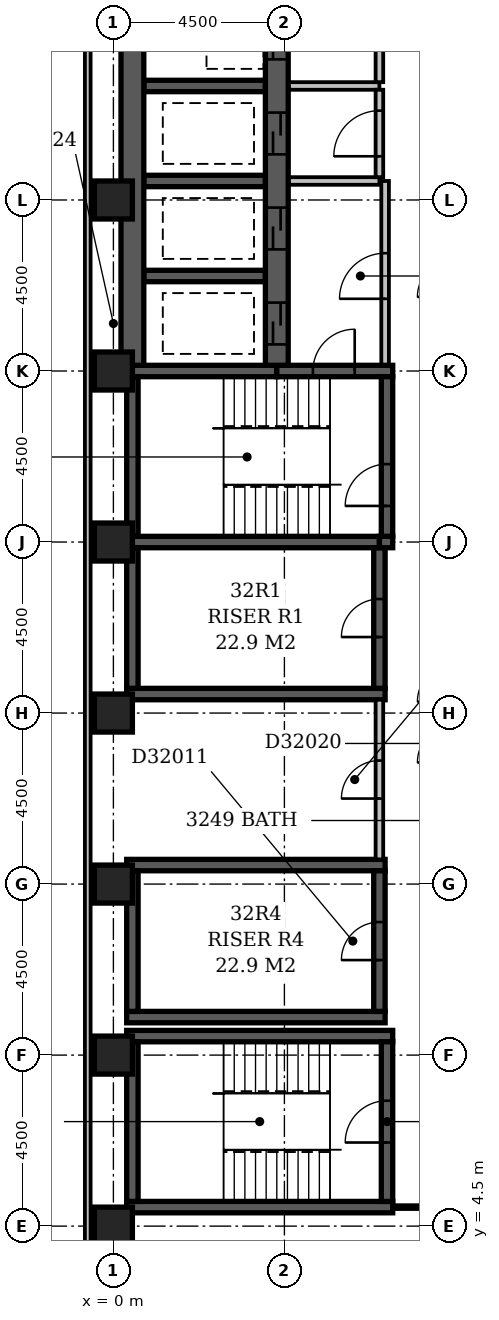
"""IFC4 building model, lengths in metres.
Left out: names, types, materials, properties, quantities, classifications, styles, units other than length and angle.
Written with IfcOpenShell. Run it as: python <this file> out.ifc"""

import sys

from ifc_helpers import new_model, si_unit, direction, frame, frame_2d, origin, origin_2d, place, context, subcontext, project, spatial, rectangle, extrude, element, fill, save


model = new_model("IFC4")
c1 = context("Model", 3, precision=1e-05, world=origin(), true_north=direction((0.0, 1.0)))
c2 = subcontext(c1, "Body", "Model", "MODEL_VIEW")
j1 = project(units=[si_unit("LENGTHUNIT", "METRE"), si_unit("PLANEANGLEUNIT", "RADIAN")], contexts=[c1])
p1 = place(None, origin())
s1 = spatial("IfcSite", under=j1, at=p1, CompositionType="ELEMENT")
p2 = place(p1, origin())
s2 = spatial("IfcBuilding", under=s1, at=p2, CompositionType="ELEMENT")
p3 = place(p2, frame((0.0, 0.0, 130.4)))
s3 = spatial("IfcBuildingStorey", under=s2, at=p3, CompositionType="ELEMENT", Elevation=130.4)
for number, where, z_axis, x_axis in (
    (1, (0.35, 5.0, -0.3), (0.0, 0.0, 1.0), (1.0, 0.0, 0.0)),
    (2, (0.35, 9.5, -0.3), (0.0, 0.0, 1.0), (1.0, 0.0, 0.0)),
):
    element("IfcWall", number, at=place(p3, frame(where, z_axis=z_axis, x_axis=x_axis)), inside=s3, PredefinedType="SHEAR", context=c2, shape_type="SweptSolid", body=[
        extrude(rectangle(XDim=7.0, YDim=0.3, at=frame_2d((3.5, 0.0))), origin(), (0.0, 0.0, 1.0), 3.6),
    ])
for number, where, z_axis, x_axis in (
    (3, (0.35, 10.0, -0.3), (0.0, 0.0, 1.0), (1.0, 0.0, 0.0)),
    (4, (0.35, 14.0, -0.3), (0.0, 0.0, 1.0), (1.0, 0.0, 0.0)),
    (5, (0.35, 18.5, -0.3), (0.0, 0.0, 1.0), (1.0, 0.0, 0.0)),
):
    element("IfcWall", number, at=place(p3, frame(where, z_axis=z_axis, x_axis=x_axis)), inside=s3, PredefinedType="SHEAR", context=c2, shape_type="SweptSolid", body=[
        extrude(rectangle(XDim=6.8, YDim=0.3, at=frame_2d((3.4, 0.0))), origin(), (0.0, 0.0, 1.0), 3.6),
    ])
p4 = place(p3, frame((0.35, 22.5, -0.3), z_axis=(0.0, 0.0, 1.0), x_axis=(1.0, 0.0, 0.0)))
e6 = element("IfcWall", 6, at=p4, inside=s3, PredefinedType="SHEAR", context=c2, shape_type="SweptSolid", body=[
    extrude(rectangle(XDim=6.65, YDim=0.3, at=frame_2d((3.325, 0.0))), origin(), (0.0, 0.0, 1.0), 3.6),
])
p5 = place(p3, frame((0.35, 27.0, -0.3), z_axis=(0.0, 0.0, 1.0), x_axis=(1.0, 0.0, 0.0)))
e7 = element("IfcWall", 7, at=p5, inside=s3, PredefinedType="SHEAR", context=c2, shape_type="SweptSolid", body=[
    extrude(rectangle(XDim=3.95, YDim=0.3, at=frame_2d((1.975, 0.0))), origin(), (0.0, 0.0, 1.0), 3.6),
])
p6 = place(p3, frame((0.5, 5.15, -0.3), z_axis=(0.0, 0.0, 1.0), x_axis=(0.0, 1.0, 0.0)))
e8 = element("IfcWall", 8, at=p6, inside=s3, PredefinedType="SHEAR", context=c2, shape_type="SweptSolid", body=[
    extrude(rectangle(XDim=4.2, YDim=0.3, at=frame_2d((2.1, 0.0))), origin(), (0.0, 0.0, 1.0), 3.6),
])
for number, where, z_axis, x_axis in (
    (9, (0.5, 10.15, -0.3), (0.0, 0.0, 1.0), (0.0, 1.0, 0.0)),
    (10, (0.5, 18.65, -0.3), (0.0, 0.0, 1.0), (0.0, 1.0, 0.0)),
):
    element("IfcWall", number, at=place(p3, frame(where, z_axis=z_axis, x_axis=x_axis)), inside=s3, PredefinedType="SHEAR", context=c2, shape_type="SweptSolid", body=[
        extrude(rectangle(XDim=3.7, YDim=0.3, at=frame_2d((1.85, 0.0))), origin(), (0.0, 0.0, 1.0), 3.6),
    ])
p7 = place(p3, frame((0.5, 22.65, -0.3), z_axis=(0.0, 0.0, 1.0), x_axis=(0.0, 1.0, 0.0)))
e11 = element("IfcWall", 11, at=p7, inside=s3, PredefinedType="SHEAR", context=c2, shape_type="SweptSolid", body=[
    extrude(rectangle(XDim=4.2, YDim=0.3, at=frame_2d((2.1, 0.0))), origin(), (0.0, 0.0, 1.0), 3.6),
])
p8 = place(p3, frame((0.5, 27.15, -0.3), z_axis=(0.0, 0.0, 1.0), x_axis=(0.0, 1.0, 0.0)))
e12 = element("IfcWall", 12, at=p8, inside=s3, PredefinedType="SHEAR", context=c2, shape_type="SweptSolid", body=[
    extrude(rectangle(XDim=22.05, YDim=0.6, at=frame_2d((11.025, 0.0))), origin(), (0.0, 0.0, 1.0), 3.6),
])
for number, where, z_axis, x_axis in (
    (13, (0.8, 29.5, -0.3), (0.0, 0.0, 1.0), (1.0, 0.0, 0.0)),
    (14, (0.8, 32.0, -0.3), (0.0, 0.0, 1.0), (1.0, 0.0, 0.0)),
    (15, (0.8, 34.5, -0.3), (0.0, 0.0, 1.0), (1.0, 0.0, 0.0)),
):
    element("IfcWall", number, at=place(p3, frame(where, z_axis=z_axis, x_axis=x_axis)), inside=s3, PredefinedType="SHEAR", context=c2, shape_type="SweptSolid", body=[
        extrude(rectangle(XDim=3.2, YDim=0.3, at=frame_2d((1.6, 0.0))), origin(), (0.0, 0.0, 1.0), 3.6),
    ])
p9 = place(p3, frame((4.3, 27.0, -0.3), z_axis=(0.0, 0.0, 1.0), x_axis=(1.0, 0.0, 0.0)))
e16 = element("IfcWall", 16, at=p9, inside=s3, PredefinedType="SHEAR", context=c2, shape_type="SweptSolid", body=[
    extrude(rectangle(XDim=3.05, YDim=0.3, at=frame_2d((1.525, 0.0))), origin(), (0.0, 0.0, 1.0), 3.6),
])
p10 = place(p9, frame((0.95, 0.0, 0.3)))
e17 = element("IfcOpeningElement", 17, at=p10, cuts=e16, PredefinedType="OPENING", context=c2, shape_type="SweptSolid", body=[
    extrude(rectangle(XDim=1.1, YDim=2.1, at=frame_2d((0.55, 1.05))), frame((0.0, 0.162, 0.0), z_axis=(0.0, -1.0, 0.0), x_axis=(1.0, 0.0, 0.0)), (0.0, 0.0, 1.0), 0.324),
])
p11 = place(p3, frame((4.3, 27.15, -0.3), z_axis=(0.0, 0.0, 1.0), x_axis=(0.0, 1.0, 0.0)))
e18 = element("IfcWall", 18, at=p11, inside=s3, PredefinedType="SHEAR", context=c2, shape_type="SweptSolid", body=[
    extrude(rectangle(XDim=22.05, YDim=0.6, at=frame_2d((11.025, 0.0))), origin(), (0.0, 0.0, 1.0), 3.6),
])
p12 = place(p11, frame((3.05, 0.0, 0.3)))
e19 = element("IfcOpeningElement", 19, at=p12, cuts=e18, PredefinedType="OPENING", context=c2, shape_type="SweptSolid", body=[
    extrude(rectangle(XDim=1.1, YDim=2.1, at=frame_2d((0.55, 1.05))), frame((0.0, 0.312, 0.0), z_axis=(0.0, -1.0, 0.0), x_axis=(1.0, 0.0, 0.0)), (0.0, 0.0, 1.0), 0.624),
])
p13 = place(p11, frame((0.55, 0.0, 0.3)))
e20 = element("IfcOpeningElement", 20, at=p13, cuts=e18, PredefinedType="OPENING", context=c2, shape_type="SweptSolid", body=[
    extrude(rectangle(XDim=1.1, YDim=2.1, at=frame_2d((0.55, 1.05))), frame((0.0, 0.312, 0.0), z_axis=(0.0, -1.0, 0.0), x_axis=(1.0, 0.0, 0.0)), (0.0, 0.0, 1.0), 0.624),
])
p14 = place(p11, frame((20.55, 0.0, 0.3)))
e21 = element("IfcOpeningElement", 21, at=p14, cuts=e18, PredefinedType="OPENING", context=c2, shape_type="SweptSolid", body=[
    extrude(rectangle(XDim=1.1, YDim=2.1, at=frame_2d((0.55, 1.05))), frame((0.0, 0.312, 0.0), z_axis=(0.0, -1.0, 0.0), x_axis=(1.0, 0.0, 0.0)), (0.0, 0.0, 1.0), 0.624),
])
p15 = place(p11, frame((18.05, 0.0, 0.3)))
e22 = element("IfcOpeningElement", 22, at=p15, cuts=e18, PredefinedType="OPENING", context=c2, shape_type="SweptSolid", body=[
    extrude(rectangle(XDim=1.1, YDim=2.1, at=frame_2d((0.55, 1.05))), frame((0.0, 0.312, 0.0), z_axis=(0.0, -1.0, 0.0), x_axis=(1.0, 0.0, 0.0)), (0.0, 0.0, 1.0), 0.624),
])
p16 = place(p11, frame((15.55, 0.0, 0.3)))
e23 = element("IfcOpeningElement", 23, at=p16, cuts=e18, PredefinedType="OPENING", context=c2, shape_type="SweptSolid", body=[
    extrude(rectangle(XDim=1.1, YDim=2.1, at=frame_2d((0.55, 1.05))), frame((0.0, 0.312, 0.0), z_axis=(0.0, -1.0, 0.0), x_axis=(1.0, 0.0, 0.0)), (0.0, 0.0, 1.0), 0.624),
])
p17 = place(p11, frame((13.05, 0.0, 0.3)))
e24 = element("IfcOpeningElement", 24, at=p17, cuts=e18, PredefinedType="OPENING", context=c2, shape_type="SweptSolid", body=[
    extrude(rectangle(XDim=1.1, YDim=2.1, at=frame_2d((0.55, 1.05))), frame((0.0, 0.312, 0.0), z_axis=(0.0, -1.0, 0.0), x_axis=(1.0, 0.0, 0.0)), (0.0, 0.0, 1.0), 0.624),
])
p18 = place(p11, frame((10.55, 0.0, 0.3)))
e25 = element("IfcOpeningElement", 25, at=p18, cuts=e18, PredefinedType="OPENING", context=c2, shape_type="SweptSolid", body=[
    extrude(rectangle(XDim=1.1, YDim=2.1, at=frame_2d((0.55, 1.05))), frame((0.0, 0.312, 0.0), z_axis=(0.0, -1.0, 0.0), x_axis=(1.0, 0.0, 0.0)), (0.0, 0.0, 1.0), 0.624),
])
p19 = place(p11, frame((8.05, 0.0, 0.3)))
e26 = element("IfcOpeningElement", 26, at=p19, cuts=e18, PredefinedType="OPENING", context=c2, shape_type="SweptSolid", body=[
    extrude(rectangle(XDim=1.1, YDim=2.1, at=frame_2d((0.55, 1.05))), frame((0.0, 0.312, 0.0), z_axis=(0.0, -1.0, 0.0), x_axis=(1.0, 0.0, 0.0)), (0.0, 0.0, 1.0), 0.624),
])
p20 = place(p11, frame((5.55, 0.0, 0.3)))
e27 = element("IfcOpeningElement", 27, at=p20, cuts=e18, PredefinedType="OPENING", context=c2, shape_type="SweptSolid", body=[
    extrude(rectangle(XDim=1.1, YDim=2.1, at=frame_2d((0.55, 1.05))), frame((0.0, 0.312, 0.0), z_axis=(0.0, -1.0, 0.0), x_axis=(1.0, 0.0, 0.0)), (0.0, 0.0, 1.0), 0.624),
])
p21 = place(p3, frame((7.0, 10.15, -0.3), z_axis=(0.0, 0.0, 1.0), x_axis=(0.0, 1.0, 0.0)))
e28 = element("IfcWall", 28, at=p21, inside=s3, PredefinedType="SHEAR", context=c2, shape_type="SweptSolid", body=[
    extrude(rectangle(XDim=3.7, YDim=0.3, at=frame_2d((1.85, 0.0))), origin(), (0.0, 0.0, 1.0), 3.6),
])
p22 = place(p21, frame((1.35, 0.0, 0.3)))
e29 = element("IfcOpeningElement", 29, at=p22, cuts=e28, PredefinedType="OPENING", context=c2, shape_type="SweptSolid", body=[
    extrude(rectangle(XDim=1.0, YDim=2.1, at=frame_2d((0.5, 1.05))), frame((0.0, 0.162, 0.0), z_axis=(0.0, -1.0, 0.0), x_axis=(1.0, 0.0, 0.0)), (0.0, 0.0, 1.0), 0.324),
])
p23 = place(p3, frame((7.0, 18.65, -0.3), z_axis=(0.0, 0.0, 1.0), x_axis=(0.0, 1.0, 0.0)))
e30 = element("IfcWall", 30, at=p23, inside=s3, PredefinedType="SHEAR", context=c2, shape_type="SweptSolid", body=[
    extrude(rectangle(XDim=3.7, YDim=0.3, at=frame_2d((1.85, 0.0))), origin(), (0.0, 0.0, 1.0), 3.6),
])
p24 = place(p23, frame((1.35, 0.0, 0.3)))
e31 = element("IfcOpeningElement", 31, at=p24, cuts=e30, PredefinedType="OPENING", context=c2, shape_type="SweptSolid", body=[
    extrude(rectangle(XDim=1.0, YDim=2.1, at=frame_2d((0.5, 1.05))), frame((0.0, 0.162, 0.0), z_axis=(0.0, -1.0, 0.0), x_axis=(1.0, 0.0, 0.0)), (0.0, 0.0, 1.0), 0.324),
])
p25 = place(p3, frame((7.0, 22.5, -0.3), z_axis=(0.0, 0.0, 1.0), x_axis=(1.0, 0.0, 0.0)))
e32 = element("IfcWall", 32, at=p25, inside=s3, PredefinedType="SHEAR", context=c2, shape_type="SweptSolid", body=[
    extrude(rectangle(XDim=0.35, YDim=0.3, at=frame_2d((0.175, 0.0))), origin(), (0.0, 0.0, 1.0), 3.6),
])
p26 = place(p3, frame((7.2, 5.15, -0.3), z_axis=(0.0, 0.0, 1.0), x_axis=(0.0, 1.0, 0.0)))
e33 = element("IfcWall", 33, at=p26, inside=s3, PredefinedType="SHEAR", context=c2, shape_type="SweptSolid", body=[
    extrude(rectangle(XDim=4.2, YDim=0.3, at=frame_2d((2.1, 0.0))), origin(), (0.0, 0.0, 1.0), 3.6),
])
p27 = place(p26, frame((1.55, 0.0, 0.3)))
e34 = element("IfcOpeningElement", 34, at=p27, cuts=e33, PredefinedType="OPENING", context=c2, shape_type="SweptSolid", body=[
    extrude(rectangle(XDim=1.1, YDim=2.1, at=frame_2d((0.55, 1.05))), frame((0.0, 0.162, 0.0), z_axis=(0.0, -1.0, 0.0), x_axis=(1.0, 0.0, 0.0)), (0.0, 0.0, 1.0), 0.324),
])
p28 = place(p3, frame((7.2, 22.65, -0.3), z_axis=(0.0, 0.0, 1.0), x_axis=(0.0, 1.0, 0.0)))
e35 = element("IfcWall", 35, at=p28, inside=s3, PredefinedType="SHEAR", context=c2, shape_type="SweptSolid", body=[
    extrude(rectangle(XDim=4.2, YDim=0.3, at=frame_2d((2.1, 0.0))), origin(), (0.0, 0.0, 1.0), 3.6),
])
p29 = place(p28, frame((0.8, 0.0, 0.3)))
e36 = element("IfcOpeningElement", 36, at=p29, cuts=e35, PredefinedType="OPENING", context=c2, shape_type="SweptSolid", body=[
    extrude(rectangle(XDim=1.1, YDim=2.1, at=frame_2d((0.55, 1.05))), frame((0.0, 0.162, 0.0), z_axis=(0.0, -1.0, 0.0), x_axis=(1.0, 0.0, 0.0)), (0.0, 0.0, 1.0), 0.324),
])
for number, where, z_axis, x_axis in (
    (37, (0.0, 4.5, -0.3), (0.0, 0.0, 1.0), (1.0, 0.0, 0.0)),
    (38, (0.0, 9.0, -0.3), (0.0, 0.0, 1.0), (1.0, 0.0, 0.0)),
    (39, (0.0, 13.5, -0.3), (0.0, 0.0, 1.0), (1.0, 0.0, 0.0)),
    (40, (0.0, 18.0, -0.3), (0.0, 0.0, 1.0), (1.0, 0.0, 0.0)),
    (41, (0.0, 22.5, -0.3), (0.0, 0.0, 1.0), (1.0, 0.0, 0.0)),
    (42, (0.0, 27.0, -0.3), (0.0, 0.0, 1.0), (1.0, 0.0, 0.0)),
    (43, (0.0, 31.5, -0.3), (0.0, 0.0, 1.0), (1.0, 0.0, 0.0)),
):
    element("IfcColumn", number, at=place(p3, frame(where, z_axis=z_axis, x_axis=x_axis)), inside=s3, PredefinedType="COLUMN", context=c2, shape_type="SweptSolid", body=[
        extrude(rectangle(XDim=1.0, YDim=1.0, at=origin_2d()), origin(), (0.0, 0.0, 1.0), 3.6),
    ])
p30 = place(p3, frame((-0.675, 59.1, 0.0), z_axis=(0.0, 0.0, 1.0), x_axis=(0.0, -1.0, 0.0)))
e44 = element("IfcWall", 44, at=p30, inside=s3, PredefinedType="STANDARD", context=c2, shape_type="SweptSolid", body=[
    extrude(rectangle(XDim=55.35, YDim=0.15, at=frame_2d((27.675, 0.0))), origin(), (0.0, 0.0, 1.0), 2.7),
])
p31 = place(p3, frame((4.62, 34.5, 0.0), z_axis=(0.0, 0.0, 1.0), x_axis=(1.0, 0.0, 0.0)))
e45 = element("IfcWall", 45, at=p31, inside=s3, PredefinedType="PARTITIONING", context=c2, shape_type="SweptSolid", body=[
    extrude(rectangle(XDim=2.38, YDim=0.2, at=frame_2d((1.19, 0.0))), origin(), (0.0, 0.0, 1.0), 3.3),
])
p32 = place(p3, frame((7.0, 34.6, 0.0), z_axis=(0.0, 0.0, 1.0), x_axis=(0.0, 1.0, 0.0)))
e46 = element("IfcWall", 46, at=p32, inside=s3, PredefinedType="PARTITIONING", context=c2, shape_type="SweptSolid", body=[
    extrude(rectangle(XDim=14.9, YDim=0.2, at=frame_2d((7.45, 0.0))), origin(), (0.0, 0.0, 1.0), 3.3),
])
p33 = place(p32, frame((2.8, 0.0, 0.0)))
e47 = element("IfcOpeningElement", 47, at=p33, cuts=e46, PredefinedType="OPENING", context=c2, shape_type="SweptSolid", body=[
    extrude(rectangle(XDim=1.2, YDim=2.1, at=frame_2d((0.6, 1.05))), frame((0.0, 0.112, 0.0), z_axis=(0.0, -1.0, 0.0), x_axis=(1.0, 0.0, 0.0)), (0.0, 0.0, 1.0), 0.224),
])
p34 = place(p32, frame((9.8, 0.0, 0.0)))
e48 = element("IfcOpeningElement", 48, at=p34, cuts=e46, PredefinedType="OPENING", context=c2, shape_type="SweptSolid", body=[
    extrude(rectangle(XDim=1.2, YDim=2.1, at=frame_2d((0.6, 1.05))), frame((0.0, 0.112, 0.0), z_axis=(0.0, -1.0, 0.0), x_axis=(1.0, 0.0, 0.0)), (0.0, 0.0, 1.0), 0.224),
])
p35 = place(p3, frame((4.62, 32.0, 0.0), z_axis=(0.0, 0.0, 1.0), x_axis=(1.0, 0.0, 0.0)))
e49 = element("IfcWall", 49, at=p35, inside=s3, PredefinedType="PARTITIONING", context=c2, shape_type="SweptSolid", body=[
    extrude(rectangle(XDim=2.38, YDim=0.2, at=frame_2d((1.19, 0.0))), origin(), (0.0, 0.0, 1.0), 3.3),
])
p36 = place(p3, frame((7.0, 32.1, 0.0), z_axis=(0.0, 0.0, 1.0), x_axis=(0.0, 1.0, 0.0)))
e50 = element("IfcWall", 50, at=p36, inside=s3, PredefinedType="PARTITIONING", context=c2, shape_type="SweptSolid", body=[
    extrude(rectangle(XDim=2.3, YDim=0.2, at=frame_2d((1.15, 0.0))), origin(), (0.0, 0.0, 1.0), 3.3),
])
p37 = place(p36, frame((0.55, 0.0, 0.0)))
e51 = element("IfcOpeningElement", 51, at=p37, cuts=e50, PredefinedType="OPENING", context=c2, shape_type="SweptSolid", body=[
    extrude(rectangle(XDim=1.2, YDim=2.1, at=frame_2d((0.6, 1.05))), frame((0.0, 0.112, 0.0), z_axis=(0.0, -1.0, 0.0), x_axis=(1.0, 0.0, 0.0)), (0.0, 0.0, 1.0), 0.224),
])
p38 = place(p3, frame((7.15, 27.17, 0.0), z_axis=(0.0, 0.0, 1.0), x_axis=(0.0, 1.0, 0.0)))
e52 = element("IfcWall", 52, at=p38, inside=s3, PredefinedType="PARTITIONING", context=c2, shape_type="SweptSolid", body=[
    extrude(rectangle(XDim=4.83, YDim=0.2, at=frame_2d((2.415, 0.0))), origin(), (0.0, 0.0, 1.0), 3.3),
])
p39 = place(p38, frame((1.73, 0.0, 0.0)))
e53 = element("IfcOpeningElement", 53, at=p39, cuts=e52, PredefinedType="OPENING", context=c2, shape_type="SweptSolid", body=[
    extrude(rectangle(XDim=1.2, YDim=2.1, at=frame_2d((0.6, 1.05))), frame((0.0, 0.112, 0.0), z_axis=(0.0, -1.0, 0.0), x_axis=(1.0, 0.0, 0.0)), (0.0, 0.0, 1.0), 0.224),
])
p40 = place(p3, frame((0.0, 4.5, 0.0), z_axis=(0.0, 0.0, 1.0), x_axis=(0.0, 1.0, 0.0)))
e54 = element("IfcWall", 54, at=p40, inside=s3, PredefinedType="PARTITIONING", context=c2, shape_type="SweptSolid", body=[
    extrude(rectangle(XDim=0.5, YDim=0.1, at=frame_2d((0.25, 0.0))), origin(), (0.0, 0.0, 1.0), 2.7),
])
p41 = place(p3, frame((7.349, 5.0, 0.0), z_axis=(0.0, 0.0, 1.0), x_axis=(1.0, 0.0, 0.0)))
e55 = element("IfcWall", 55, at=p41, inside=s3, PredefinedType="PARTITIONING", context=c2, shape_type="SweptSolid", body=[
    extrude(rectangle(XDim=1.551, YDim=0.1, at=frame_2d((0.775, 0.0))), origin(), (0.0, 0.0, 1.0), 3.3),
])
p42 = place(p3, frame((7.0, 14.15, 0.0), z_axis=(0.0, 0.0, 1.0), x_axis=(0.0, 1.0, 0.0)))
e56 = element("IfcWall", 56, at=p42, inside=s3, PredefinedType="PARTITIONING", context=c2, shape_type="SweptSolid", body=[
    extrude(rectangle(XDim=4.2, YDim=0.2, at=frame_2d((2.1, 0.0))), origin(), (0.0, 0.0, 1.0), 3.3),
])
p43 = place(p42, frame((1.6, 0.0, 0.0)))
e57 = element("IfcOpeningElement", 57, at=p43, cuts=e56, PredefinedType="OPENING", context=c2, shape_type="SweptSolid", body=[
    extrude(rectangle(XDim=1.0, YDim=2.1, at=frame_2d((0.5, 1.05))), frame((0.0, 0.112, 0.0), z_axis=(0.0, -1.0, 0.0), x_axis=(1.0, 0.0, 0.0)), (0.0, 0.0, 1.0), 0.224),
])
p44 = place(p39, origin())
e58 = element("IfcDoor", 58, at=p44, inside=s3, OperationType="SINGLE_SWING_LEFT", PredefinedType="DOOR", context=c2, shape_type="SweptSolid", body=[
    extrude(rectangle(XDim=1.2, YDim=2.1, at=frame_2d((0.6, 1.05))), frame((0.0, 0.025, 0.0), z_axis=(0.0, -1.0, 0.0), x_axis=(1.0, 0.0, 0.0)), (0.0, 0.0, 1.0), 0.05),
])
fill(e53, e58)
p45 = place(p12, origin())
e59 = element("IfcDoor", 59, at=p45, inside=s3, OperationType="SLIDING_TO_LEFT", PredefinedType="DOOR", context=c2, shape_type="SweptSolid", body=[
    extrude(rectangle(XDim=1.1, YDim=2.1, at=frame_2d((0.55, 1.05))), frame((0.0, 0.025, 0.0), z_axis=(0.0, -1.0, 0.0), x_axis=(1.0, 0.0, 0.0)), (0.0, 0.0, 1.0), 0.05),
])
fill(e19, e59)
p46 = place(p13, origin())
e60 = element("IfcDoor", 60, at=p46, inside=s3, OperationType="SLIDING_TO_LEFT", PredefinedType="DOOR", context=c2, shape_type="SweptSolid", body=[
    extrude(rectangle(XDim=1.1, YDim=2.1, at=frame_2d((0.55, 1.05))), frame((0.0, 0.025, 0.0), z_axis=(0.0, -1.0, 0.0), x_axis=(1.0, 0.0, 0.0)), (0.0, 0.0, 1.0), 0.05),
])
fill(e20, e60)
p47 = place(p19, origin())
e61 = element("IfcDoor", 61, at=p47, inside=s3, OperationType="SLIDING_TO_LEFT", PredefinedType="DOOR", context=c2, shape_type="SweptSolid", body=[
    extrude(rectangle(XDim=1.1, YDim=2.1, at=frame_2d((0.55, 1.05))), frame((0.0, 0.025, 0.0), z_axis=(0.0, -1.0, 0.0), x_axis=(1.0, 0.0, 0.0)), (0.0, 0.0, 1.0), 0.05),
])
fill(e26, e61)
p48 = place(p37, origin())
e62 = element("IfcDoor", 62, at=p48, inside=s3, OperationType="SINGLE_SWING_LEFT", PredefinedType="DOOR", context=c2, shape_type="SweptSolid", body=[
    extrude(rectangle(XDim=1.2, YDim=2.1, at=frame_2d((0.6, 1.05))), frame((0.0, 0.025, 0.0), z_axis=(0.0, -1.0, 0.0), x_axis=(1.0, 0.0, 0.0)), (0.0, 0.0, 1.0), 0.05),
])
fill(e51, e62)
p49 = place(p20, origin())
e63 = element("IfcDoor", 63, at=p49, inside=s3, OperationType="SLIDING_TO_LEFT", PredefinedType="DOOR", context=c2, shape_type="SweptSolid", body=[
    extrude(rectangle(XDim=1.1, YDim=2.1, at=frame_2d((0.55, 1.05))), frame((0.0, 0.025, 0.0), z_axis=(0.0, -1.0, 0.0), x_axis=(1.0, 0.0, 0.0)), (0.0, 0.0, 1.0), 0.05),
])
fill(e27, e63)
p50 = place(p24, origin())
e64 = element("IfcDoor", 64, at=p50, inside=s3, OperationType="SINGLE_SWING_LEFT", PredefinedType="DOOR", context=c2, shape_type="SweptSolid", body=[
    extrude(rectangle(XDim=1.0, YDim=2.1, at=frame_2d((0.5, 1.05))), frame((0.0, 0.025, 0.0), z_axis=(0.0, -1.0, 0.0), x_axis=(1.0, 0.0, 0.0)), (0.0, 0.0, 1.0), 0.05),
])
fill(e31, e64)
p51 = place(p22, origin())
e65 = element("IfcDoor", 65, at=p51, inside=s3, OperationType="SINGLE_SWING_LEFT", PredefinedType="DOOR", context=c2, shape_type="SweptSolid", body=[
    extrude(rectangle(XDim=1.0, YDim=2.1, at=frame_2d((0.5, 1.05))), frame((0.0, 0.025, 0.0), z_axis=(0.0, -1.0, 0.0), x_axis=(1.0, 0.0, 0.0)), (0.0, 0.0, 1.0), 0.05),
])
fill(e29, e65)
p52 = place(p10, frame((1.1, 0.0, 0.0), z_axis=(0.0, 0.0, 1.0), x_axis=(-1.0, 0.0, 0.0)))
e66 = element("IfcDoor", 66, at=p52, inside=s3, OperationType="SINGLE_SWING_LEFT", PredefinedType="DOOR", context=c2, shape_type="SweptSolid", body=[
    extrude(rectangle(XDim=1.1, YDim=2.1, at=frame_2d((0.55, 1.05))), frame((0.0, 0.025, 0.0), z_axis=(0.0, -1.0, 0.0), x_axis=(1.0, 0.0, 0.0)), (0.0, 0.0, 1.0), 0.05),
])
fill(e17, e66)
p53 = place(p29, origin())
e67 = element("IfcDoor", 67, at=p53, inside=s3, OperationType="SINGLE_SWING_LEFT", PredefinedType="DOOR", context=c2, shape_type="SweptSolid", body=[
    extrude(rectangle(XDim=1.1, YDim=2.1, at=frame_2d((0.55, 1.05))), frame((0.0, 0.025, 0.0), z_axis=(0.0, -1.0, 0.0), x_axis=(1.0, 0.0, 0.0)), (0.0, 0.0, 1.0), 0.05),
])
fill(e36, e67)
p54 = place(p27, origin())
e68 = element("IfcDoor", 68, at=p54, inside=s3, OperationType="SINGLE_SWING_LEFT", PredefinedType="DOOR", context=c2, shape_type="SweptSolid", body=[
    extrude(rectangle(XDim=1.1, YDim=2.1, at=frame_2d((0.55, 1.05))), frame((0.0, 0.025, 0.0), z_axis=(0.0, -1.0, 0.0), x_axis=(1.0, 0.0, 0.0)), (0.0, 0.0, 1.0), 0.05),
])
fill(e34, e68)
p55 = place(p43, origin())
e69 = element("IfcDoor", 69, at=p55, inside=s3, OperationType="SINGLE_SWING_LEFT", PredefinedType="DOOR", context=c2, shape_type="SweptSolid", body=[
    extrude(rectangle(XDim=1.0, YDim=2.1, at=frame_2d((0.5, 1.05))), frame((0.0, 0.025, 0.0), z_axis=(0.0, -1.0, 0.0), x_axis=(1.0, 0.0, 0.0)), (0.0, 0.0, 1.0), 0.05),
])
fill(e57, e69)
save(model, sys.argv[1])
